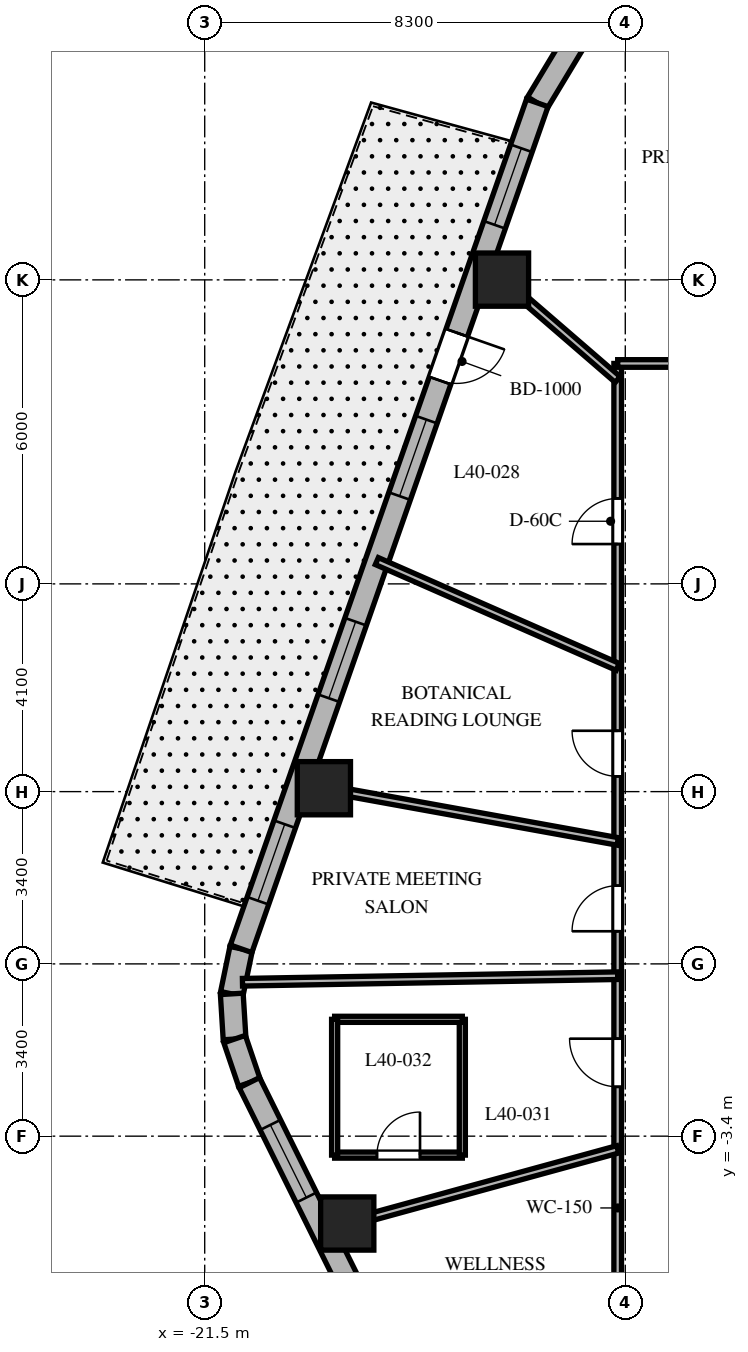
"""IFC4 building model, lengths in metres.
Left out: names, types, materials, properties, quantities, classifications, styles, units other than length and angle.
Written with IfcOpenShell. Run it as: python <this file> out.ifc"""

import sys

from ifc_helpers import new_model, si_unit, direction, frame, frame_2d, origin, origin_2d, place, context, subcontext, project, spatial, rectangle, extrude, element, fill, save


model = new_model("IFC4")
c1 = context("Model", 3, precision=1e-05, world=origin(), true_north=direction((0.0, 1.0)))
c2 = subcontext(c1, "Body", "Model", "MODEL_VIEW")
j1 = project(units=[si_unit("LENGTHUNIT", "METRE"), si_unit("PLANEANGLEUNIT", "RADIAN")], contexts=[c1])
p1 = place(None, origin())
s1 = spatial("IfcSite", under=j1, at=p1, CompositionType="ELEMENT")
p2 = place(p1, origin())
s2 = spatial("IfcBuilding", under=s1, at=p2, CompositionType="ELEMENT")
p3 = place(p2, frame((0.0, 0.0, 162.8)))
s3 = spatial("IfcBuildingStorey", under=s2, at=p3, CompositionType="ELEMENT", Elevation=162.8)
for number, where, z_axis, x_axis in (
    (1, (-15.633, 13.505, 0.0), (0.0, 0.0, 1.0), (1.0, 0.0, 0.0)),
    (2, (-19.148, 3.467, 0.0), (0.0, 0.0, 1.0), (1.0, 0.0, 0.0)),
    (3, (-18.687, -5.124, 0.0), (0.0, 0.0, 1.0), (1.0, 0.0, 0.0)),
):
    element("IfcColumn", number, at=place(p3, frame(where, z_axis=z_axis, x_axis=x_axis)), inside=s3, PredefinedType="COLUMN", context=c2, shape_type="SweptSolid", body=[
        extrude(rectangle(XDim=1.05, YDim=1.05, at=origin_2d()), origin(), (0.0, 0.0, 1.0), 3.7),
    ])
p4 = place(p3, frame((-14.214, 18.192, 0.0), z_axis=(0.0, 0.0, 1.0), x_axis=(-0.516340945502, -0.856383108193, 0.0)))
e4 = element("IfcWall", 4, at=p4, inside=s3, PredefinedType="SOLIDWALL", context=c2, shape_type="SweptSolid", body=[
    extrude(rectangle(XDim=1.4, YDim=0.45, at=frame_2d((0.7, 0.0))), origin(), (0.0, 0.0, 1.0), 3.4),
])
p5 = place(p3, frame((-20.782, 0.298, 0.0), z_axis=(0.0, 0.0, 1.0), x_axis=(-0.202570068411, -0.979267771033, 0.0)))
e5 = element("IfcWall", 5, at=p5, inside=s3, PredefinedType="SOLIDWALL", context=c2, shape_type="SweptSolid", body=[
    extrude(rectangle(XDim=0.909, YDim=0.45, at=frame_2d((0.454, 0.0))), origin(), (0.0, 0.0, 1.0), 3.4),
])
p6 = place(p3, frame((-20.966, -0.592, 0.0), z_axis=(0.0, 0.0, 1.0), x_axis=(0.061748898935, -0.998091715966, 0.0)))
e6 = element("IfcWall", 6, at=p6, inside=s3, PredefinedType="SOLIDWALL", context=c2, shape_type="SweptSolid", body=[
    extrude(rectangle(XDim=0.894, YDim=0.45, at=frame_2d((0.447, 0.0))), origin(), (0.0, 0.0, 1.0), 3.4),
])
p7 = place(p3, frame((-20.911, -1.484, 0.0), z_axis=(0.0, 0.0, 1.0), x_axis=(0.321623334353, -0.946867694453, 0.0)))
e7 = element("IfcWall", 7, at=p7, inside=s3, PredefinedType="SOLIDWALL", context=c2, shape_type="SweptSolid", body=[
    extrude(rectangle(XDim=0.909, YDim=0.45, at=frame_2d((0.454, 0.0))), origin(), (0.0, 0.0, 1.0), 3.4),
])
p8 = place(p3, frame((-14.937, 16.993, 0.0), z_axis=(0.0, 0.0, 1.0), x_axis=(-0.330431575061, -0.943829949834, 0.0)))
e8 = element("IfcWall", 8, at=p8, inside=s3, PredefinedType="SOLIDWALL", context=c2, shape_type="SweptSolid", body=[
    extrude(rectangle(XDim=17.689, YDim=0.45, at=frame_2d((8.844, 0.0))), origin(), (0.0, 0.0, 1.0), 3.4),
])
p9 = place(p8, frame((4.807, 0.0, 0.0)))
e9 = element("IfcOpeningElement", 9, at=p9, cuts=e8, PredefinedType="OPENING", context=c2, shape_type="SweptSolid", body=[
    extrude(rectangle(XDim=1.0, YDim=2.15, at=frame_2d((0.5, 1.075))), frame((0.0, 0.235, 0.0), z_axis=(0.0, -1.0, 0.0), x_axis=(1.0, 0.0, 0.0)), (0.0, 0.0, 1.0), 0.47),
])
p10 = place(p8, frame((0.95, 0.0, 0.8)))
e10 = element("IfcOpeningElement", 10, at=p10, cuts=e8, PredefinedType="OPENING", context=c2, shape_type="SweptSolid", body=[
    extrude(rectangle(XDim=1.6, YDim=1.75, at=frame_2d((0.8, 0.875))), frame((0.0, 0.235, 0.0), z_axis=(0.0, -1.0, 0.0), x_axis=(1.0, 0.0, 0.0)), (0.0, 0.0, 1.0), 0.47),
])
p11 = place(p8, frame((6.623, 0.0, 0.8)))
e11 = element("IfcOpeningElement", 11, at=p11, cuts=e8, PredefinedType="OPENING", context=c2, shape_type="SweptSolid", body=[
    extrude(rectangle(XDim=1.6, YDim=1.75, at=frame_2d((0.8, 0.875))), frame((0.0, 0.235, 0.0), z_axis=(0.0, -1.0, 0.0), x_axis=(1.0, 0.0, 0.0)), (0.0, 0.0, 1.0), 0.47),
])
p12 = place(p8, frame((10.849, 0.0, 0.8)))
e12 = element("IfcOpeningElement", 12, at=p12, cuts=e8, PredefinedType="OPENING", context=c2, shape_type="SweptSolid", body=[
    extrude(rectangle(XDim=1.6, YDim=1.75, at=frame_2d((0.8, 0.875))), frame((0.0, 0.235, 0.0), z_axis=(0.0, -1.0, 0.0), x_axis=(1.0, 0.0, 0.0)), (0.0, 0.0, 1.0), 0.47),
])
p13 = place(p8, frame((15.084, 0.0, 0.8)))
e13 = element("IfcOpeningElement", 13, at=p13, cuts=e8, PredefinedType="OPENING", context=c2, shape_type="SweptSolid", body=[
    extrude(rectangle(XDim=1.6, YDim=1.75, at=frame_2d((0.8, 0.875))), frame((0.0, 0.235, 0.0), z_axis=(0.0, -1.0, 0.0), x_axis=(1.0, 0.0, 0.0)), (0.0, 0.0, 1.0), 0.47),
])
p14 = place(p3, frame((-20.618, -2.344, 0.0), z_axis=(0.0, 0.0, 1.0), x_axis=(0.444243691097, -0.895905990002, 0.0)))
e14 = element("IfcWall", 14, at=p14, inside=s3, PredefinedType="SOLIDWALL", context=c2, shape_type="SweptSolid", body=[
    extrude(rectangle(XDim=16.784, YDim=0.45, at=frame_2d((8.392, 0.0))), origin(), (0.0, 0.0, 1.0), 3.4),
])
p15 = place(p14, frame((0.931, 0.0, 0.8)))
e15 = element("IfcOpeningElement", 15, at=p15, cuts=e14, PredefinedType="OPENING", context=c2, shape_type="SweptSolid", body=[
    extrude(rectangle(XDim=1.6, YDim=1.75, at=frame_2d((0.8, 0.875))), frame((0.0, 0.235, 0.0), z_axis=(0.0, -1.0, 0.0), x_axis=(1.0, 0.0, 0.0)), (0.0, 0.0, 1.0), 0.47),
])
p16 = place(p14, frame((7.642, 0.0, 0.8)))
e16 = element("IfcOpeningElement", 16, at=p16, cuts=e14, PredefinedType="OPENING", context=c2, shape_type="SweptSolid", body=[
    extrude(rectangle(XDim=1.6, YDim=1.75, at=frame_2d((0.8, 0.875))), frame((0.0, 0.235, 0.0), z_axis=(0.0, -1.0, 0.0), x_axis=(1.0, 0.0, 0.0)), (0.0, 0.0, 1.0), 0.47),
])
p17 = place(p14, frame((14.303, 0.0, 0.8)))
e17 = element("IfcOpeningElement", 17, at=p17, cuts=e14, PredefinedType="OPENING", context=c2, shape_type="SweptSolid", body=[
    extrude(rectangle(XDim=1.6, YDim=1.75, at=frame_2d((0.8, 0.875))), frame((0.0, 0.235, 0.0), z_axis=(0.0, -1.0, 0.0), x_axis=(1.0, 0.0, 0.0)), (0.0, 0.0, 1.0), 0.47),
])
p18 = place(p3, frame((-13.35, -11.85, 0.0), z_axis=(0.0, 0.0, 1.0), x_axis=(0.0, 1.0, 0.0)))
e18 = element("IfcWall", 18, at=p18, inside=s3, PredefinedType="PARTITIONING", context=c2, shape_type="SweptSolid", body=[
    extrude(rectangle(XDim=23.7, YDim=0.15, at=frame_2d((11.85, 0.0))), origin(), (0.0, 0.0, 1.0), 2.84),
])
p19 = place(p18, frame((20.136, 0.0, 0.0)))
e19 = element("IfcOpeningElement", 19, at=p19, cuts=e18, PredefinedType="OPENING", context=c2, shape_type="SweptSolid", body=[
    extrude(rectangle(XDim=0.9, YDim=2.03, at=frame_2d((0.45, 1.015))), frame((0.0, 0.085, 0.0), z_axis=(0.0, -1.0, 0.0), x_axis=(1.0, 0.0, 0.0)), (0.0, 0.0, 1.0), 0.17),
])
p20 = place(p18, frame((15.551, 0.0, 0.0)))
e20 = element("IfcOpeningElement", 20, at=p20, cuts=e18, PredefinedType="OPENING", context=c2, shape_type="SweptSolid", body=[
    extrude(rectangle(XDim=0.9, YDim=2.03, at=frame_2d((0.45, 1.015))), frame((0.0, 0.085, 0.0), z_axis=(0.0, -1.0, 0.0), x_axis=(1.0, 0.0, 0.0)), (0.0, 0.0, 1.0), 0.17),
])
p21 = place(p18, frame((12.494, 0.0, 0.0)))
e21 = element("IfcOpeningElement", 21, at=p21, cuts=e18, PredefinedType="OPENING", context=c2, shape_type="SweptSolid", body=[
    extrude(rectangle(XDim=0.9, YDim=2.03, at=frame_2d((0.45, 1.015))), frame((0.0, 0.085, 0.0), z_axis=(0.0, -1.0, 0.0), x_axis=(1.0, 0.0, 0.0)), (0.0, 0.0, 1.0), 0.17),
])
p22 = place(p18, frame((9.424, 0.0, 0.0)))
e22 = element("IfcOpeningElement", 22, at=p22, cuts=e18, PredefinedType="OPENING", context=c2, shape_type="SweptSolid", body=[
    extrude(rectangle(XDim=0.95, YDim=2.03, at=frame_2d((0.475, 1.015))), frame((0.0, 0.085, 0.0), z_axis=(0.0, -1.0, 0.0), x_axis=(1.0, 0.0, 0.0)), (0.0, 0.0, 1.0), 0.17),
])
p23 = place(p18, frame((3.765, 0.0, 0.0)))
e23 = element("IfcOpeningElement", 23, at=p23, cuts=e18, PredefinedType="OPENING", context=c2, shape_type="SweptSolid", body=[
    extrude(rectangle(XDim=0.9, YDim=2.03, at=frame_2d((0.45, 1.015))), frame((0.0, 0.085, 0.0), z_axis=(0.0, -1.0, 0.0), x_axis=(1.0, 0.0, 0.0)), (0.0, 0.0, 1.0), 0.17),
])
p24 = place(p3, frame((-13.35, 11.85, 0.0), z_axis=(0.0, 0.0, 1.0), x_axis=(1.0, 0.0, 0.0)))
e24 = element("IfcWall", 24, at=p24, inside=s3, PredefinedType="PARTITIONING", context=c2, shape_type="SweptSolid", body=[
    extrude(rectangle(XDim=26.7, YDim=0.15, at=frame_2d((13.35, 0.0))), origin(), (0.0, 0.0, 1.0), 2.84),
])
p25 = place(p24, frame((20.682, 0.0, 0.0)))
e25 = element("IfcOpeningElement", 25, at=p25, cuts=e24, PredefinedType="OPENING", context=c2, shape_type="SweptSolid", body=[
    extrude(rectangle(XDim=0.95, YDim=2.03, at=frame_2d((0.475, 1.015))), frame((0.0, 0.085, 0.0), z_axis=(0.0, -1.0, 0.0), x_axis=(1.0, 0.0, 0.0)), (0.0, 0.0, 1.0), 0.17),
])
p26 = place(p24, frame((14.708, 0.0, 0.0)))
e26 = element("IfcOpeningElement", 26, at=p26, cuts=e24, PredefinedType="OPENING", context=c2, shape_type="SweptSolid", body=[
    extrude(rectangle(XDim=0.95, YDim=2.03, at=frame_2d((0.475, 1.015))), frame((0.0, 0.085, 0.0), z_axis=(0.0, -1.0, 0.0), x_axis=(1.0, 0.0, 0.0)), (0.0, 0.0, 1.0), 0.17),
])
p27 = place(p24, frame((10.553, 0.0, 0.0)))
e27 = element("IfcOpeningElement", 27, at=p27, cuts=e24, PredefinedType="OPENING", context=c2, shape_type="SweptSolid", body=[
    extrude(rectangle(XDim=0.95, YDim=2.03, at=frame_2d((0.475, 1.015))), frame((0.0, 0.085, 0.0), z_axis=(0.0, -1.0, 0.0), x_axis=(1.0, 0.0, 0.0)), (0.0, 0.0, 1.0), 0.17),
])
p28 = place(p24, frame((3.995, 0.0, 0.0)))
e28 = element("IfcOpeningElement", 28, at=p28, cuts=e24, PredefinedType="OPENING", context=c2, shape_type="SweptSolid", body=[
    extrude(rectangle(XDim=0.95, YDim=2.03, at=frame_2d((0.475, 1.015))), frame((0.0, 0.085, 0.0), z_axis=(0.0, -1.0, 0.0), x_axis=(1.0, 0.0, 0.0)), (0.0, 0.0, 1.0), 0.17),
])
p29 = place(p3, frame((-13.35, 11.533, 0.0), z_axis=(0.0, 0.0, 1.0), x_axis=(-0.756711647314, 0.65374879183, 0.0)))
e29 = element("IfcWall", 29, at=p29, inside=s3, PredefinedType="PARTITIONING", context=c2, shape_type="SweptSolid", body=[
    extrude(rectangle(XDim=3.55, YDim=0.15, at=frame_2d((1.775, 0.0))), origin(), (0.0, 0.0, 1.0), 2.64),
])
p30 = place(p3, frame((-13.35, 5.863, 0.0), z_axis=(0.0, 0.0, 1.0), x_axis=(-0.9155832175, 0.402128551376, 0.0)))
e30 = element("IfcWall", 30, at=p30, inside=s3, PredefinedType="PARTITIONING", context=c2, shape_type="SweptSolid", body=[
    extrude(rectangle(XDim=5.191, YDim=0.15, at=frame_2d((2.595, 0.0))), origin(), (0.0, 0.0, 1.0), 2.64),
])
p31 = place(p3, frame((-13.35, 2.417, 0.0), z_axis=(0.0, 0.0, 1.0), x_axis=(-0.98399796473, 0.178179699761, 0.0)))
e31 = element("IfcWall", 31, at=p31, inside=s3, PredefinedType="PARTITIONING", context=c2, shape_type="SweptSolid", body=[
    extrude(rectangle(XDim=6.393, YDim=0.15, at=frame_2d((3.197, 0.0))), origin(), (0.0, 0.0, 1.0), 2.64),
])
p32 = place(p3, frame((-13.35, -0.233, 0.0), z_axis=(0.0, 0.0, 1.0), x_axis=(-0.999847932133, -0.017438824797, 0.0)))
e32 = element("IfcWall", 32, at=p32, inside=s3, PredefinedType="PARTITIONING", context=c2, shape_type="SweptSolid", body=[
    extrude(rectangle(XDim=7.406, YDim=0.15, at=frame_2d((3.703, 0.0))), origin(), (0.0, 0.0, 1.0), 2.64),
])
p33 = place(p3, frame((-13.35, -3.661, 0.0), z_axis=(0.0, 0.0, 1.0), x_axis=(-0.964397145454, -0.264458211898, 0.0)))
e33 = element("IfcWall", 33, at=p33, inside=s3, PredefinedType="PARTITIONING", context=c2, shape_type="SweptSolid", body=[
    extrude(rectangle(XDim=6.039, YDim=0.15, at=frame_2d((3.019, 0.0))), origin(), (0.0, 0.0, 1.0), 2.64),
])
p34 = place(p3, frame((-18.936, -3.774, 0.0), z_axis=(0.0, 0.0, 1.0), x_axis=(1.0, 0.0, 0.0)))
e34 = element("IfcWall", 34, at=p34, inside=s3, PredefinedType="PARTITIONING", context=c2, shape_type="SweptSolid", body=[
    extrude(rectangle(XDim=2.52, YDim=0.12, at=frame_2d((1.26, 0.0))), origin(), (0.0, 0.0, 1.0), 2.64),
])
p35 = place(p34, frame((0.835, 0.0, 0.0)))
e35 = element("IfcOpeningElement", 35, at=p35, cuts=e34, PredefinedType="OPENING", context=c2, shape_type="SweptSolid", body=[
    extrude(rectangle(XDim=0.85, YDim=2.03, at=frame_2d((0.425, 1.015))), frame((0.0, 0.07, 0.0), z_axis=(0.0, -1.0, 0.0), x_axis=(1.0, 0.0, 0.0)), (0.0, 0.0, 1.0), 0.14),
])
p36 = place(p3, frame((-16.416, -3.774, 0.0), z_axis=(0.0, 0.0, 1.0), x_axis=(0.0, 1.0, 0.0)))
e36 = element("IfcWall", 36, at=p36, inside=s3, PredefinedType="PARTITIONING", context=c2, shape_type="SweptSolid", body=[
    extrude(rectangle(XDim=2.68, YDim=0.12, at=frame_2d((1.34, 0.0))), origin(), (0.0, 0.0, 1.0), 3.4),
])
p37 = place(p3, frame((-16.416, -1.094, 0.0), z_axis=(0.0, 0.0, 1.0), x_axis=(-1.0, 0.0, 0.0)))
e37 = element("IfcWall", 37, at=p37, inside=s3, PredefinedType="PARTITIONING", context=c2, shape_type="SweptSolid", body=[
    extrude(rectangle(XDim=2.52, YDim=0.12, at=frame_2d((1.26, 0.0))), origin(), (0.0, 0.0, 1.0), 2.64),
])
p38 = place(p3, frame((-18.936, -1.094, 0.0), z_axis=(0.0, 0.0, 1.0), x_axis=(0.0, -1.0, 0.0)))
e38 = element("IfcWall", 38, at=p38, inside=s3, PredefinedType="PARTITIONING", context=c2, shape_type="SweptSolid", body=[
    extrude(rectangle(XDim=2.68, YDim=0.12, at=frame_2d((1.34, 0.0))), origin(), (0.0, 0.0, 1.0), 2.64),
])
p39 = place(p9, origin())
e39 = element("IfcDoor", 39, at=p39, inside=s3, OperationType="SINGLE_SWING_LEFT", PredefinedType="DOOR", context=c2, shape_type="SweptSolid", body=[
    extrude(rectangle(XDim=1.0, YDim=2.15, at=frame_2d((0.5, 1.075))), frame((0.0, 0.025, 0.0), z_axis=(0.0, -1.0, 0.0), x_axis=(1.0, 0.0, 0.0)), (0.0, 0.0, 1.0), 0.05),
])
fill(e9, e39)
p40 = place(p10, origin())
e40 = element("IfcWindow", 40, at=p40, inside=s3, PartitioningType="SINGLE_PANEL", PredefinedType="WINDOW", context=c2, shape_type="SweptSolid", body=[
    extrude(rectangle(XDim=1.6, YDim=1.75, at=frame_2d((0.8, 0.875))), frame((0.0, 0.03, 0.0), z_axis=(0.0, -1.0, 0.0), x_axis=(1.0, 0.0, 0.0)), (0.0, 0.0, 1.0), 0.06),
])
fill(e10, e40)
p41 = place(p11, origin())
e41 = element("IfcWindow", 41, at=p41, inside=s3, PartitioningType="SINGLE_PANEL", PredefinedType="WINDOW", context=c2, shape_type="SweptSolid", body=[
    extrude(rectangle(XDim=1.6, YDim=1.75, at=frame_2d((0.8, 0.875))), frame((0.0, 0.03, 0.0), z_axis=(0.0, -1.0, 0.0), x_axis=(1.0, 0.0, 0.0)), (0.0, 0.0, 1.0), 0.06),
])
fill(e11, e41)
p42 = place(p12, origin())
e42 = element("IfcWindow", 42, at=p42, inside=s3, PartitioningType="SINGLE_PANEL", PredefinedType="WINDOW", context=c2, shape_type="SweptSolid", body=[
    extrude(rectangle(XDim=1.6, YDim=1.75, at=frame_2d((0.8, 0.875))), frame((0.0, 0.03, 0.0), z_axis=(0.0, -1.0, 0.0), x_axis=(1.0, 0.0, 0.0)), (0.0, 0.0, 1.0), 0.06),
])
fill(e12, e42)
p43 = place(p13, origin())
e43 = element("IfcWindow", 43, at=p43, inside=s3, PartitioningType="SINGLE_PANEL", PredefinedType="WINDOW", context=c2, shape_type="SweptSolid", body=[
    extrude(rectangle(XDim=1.6, YDim=1.75, at=frame_2d((0.8, 0.875))), frame((0.0, 0.03, 0.0), z_axis=(0.0, -1.0, 0.0), x_axis=(1.0, 0.0, 0.0)), (0.0, 0.0, 1.0), 0.06),
])
fill(e13, e43)
p44 = place(p15, origin())
e44 = element("IfcWindow", 44, at=p44, inside=s3, PartitioningType="SINGLE_PANEL", PredefinedType="WINDOW", context=c2, shape_type="SweptSolid", body=[
    extrude(rectangle(XDim=1.6, YDim=1.75, at=frame_2d((0.8, 0.875))), frame((0.0, 0.03, 0.0), z_axis=(0.0, -1.0, 0.0), x_axis=(1.0, 0.0, 0.0)), (0.0, 0.0, 1.0), 0.06),
])
fill(e15, e44)
p45 = place(p19, origin())
e45 = element("IfcDoor", 45, at=p45, inside=s3, OperationType="SINGLE_SWING_LEFT", PredefinedType="DOOR", context=c2, shape_type="SweptSolid", body=[
    extrude(rectangle(XDim=0.9, YDim=2.03, at=frame_2d((0.45, 1.015))), frame((0.0, 0.025, 0.0), z_axis=(0.0, -1.0, 0.0), x_axis=(1.0, 0.0, 0.0)), (0.0, 0.0, 1.0), 0.05),
])
fill(e19, e45)
p46 = place(p20, origin())
e46 = element("IfcDoor", 46, at=p46, inside=s3, OperationType="SINGLE_SWING_RIGHT", PredefinedType="DOOR", context=c2, shape_type="SweptSolid", body=[
    extrude(rectangle(XDim=0.9, YDim=2.03, at=frame_2d((0.45, 1.015))), frame((0.0, 0.025, 0.0), z_axis=(0.0, -1.0, 0.0), x_axis=(1.0, 0.0, 0.0)), (0.0, 0.0, 1.0), 0.05),
])
fill(e20, e46)
p47 = place(p21, origin())
e47 = element("IfcDoor", 47, at=p47, inside=s3, OperationType="SINGLE_SWING_LEFT", PredefinedType="DOOR", context=c2, shape_type="SweptSolid", body=[
    extrude(rectangle(XDim=0.9, YDim=2.03, at=frame_2d((0.45, 1.015))), frame((0.0, 0.025, 0.0), z_axis=(0.0, -1.0, 0.0), x_axis=(1.0, 0.0, 0.0)), (0.0, 0.0, 1.0), 0.05),
])
fill(e21, e47)
p48 = place(p22, origin())
e48 = element("IfcDoor", 48, at=p48, inside=s3, OperationType="SINGLE_SWING_RIGHT", PredefinedType="DOOR", context=c2, shape_type="SweptSolid", body=[
    extrude(rectangle(XDim=0.95, YDim=2.03, at=frame_2d((0.475, 1.015))), frame((0.0, 0.025, 0.0), z_axis=(0.0, -1.0, 0.0), x_axis=(1.0, 0.0, 0.0)), (0.0, 0.0, 1.0), 0.05),
])
fill(e22, e48)
p49 = place(p35, origin())
e49 = element("IfcDoor", 49, at=p49, inside=s3, OperationType="SINGLE_SWING_RIGHT", PredefinedType="DOOR", context=c2, shape_type="SweptSolid", body=[
    extrude(rectangle(XDim=0.85, YDim=2.03, at=frame_2d((0.425, 1.015))), frame((0.0, 0.025, 0.0), z_axis=(0.0, -1.0, 0.0), x_axis=(1.0, 0.0, 0.0)), (0.0, 0.0, 1.0), 0.05),
])
fill(e35, e49)
save(model, sys.argv[1])
